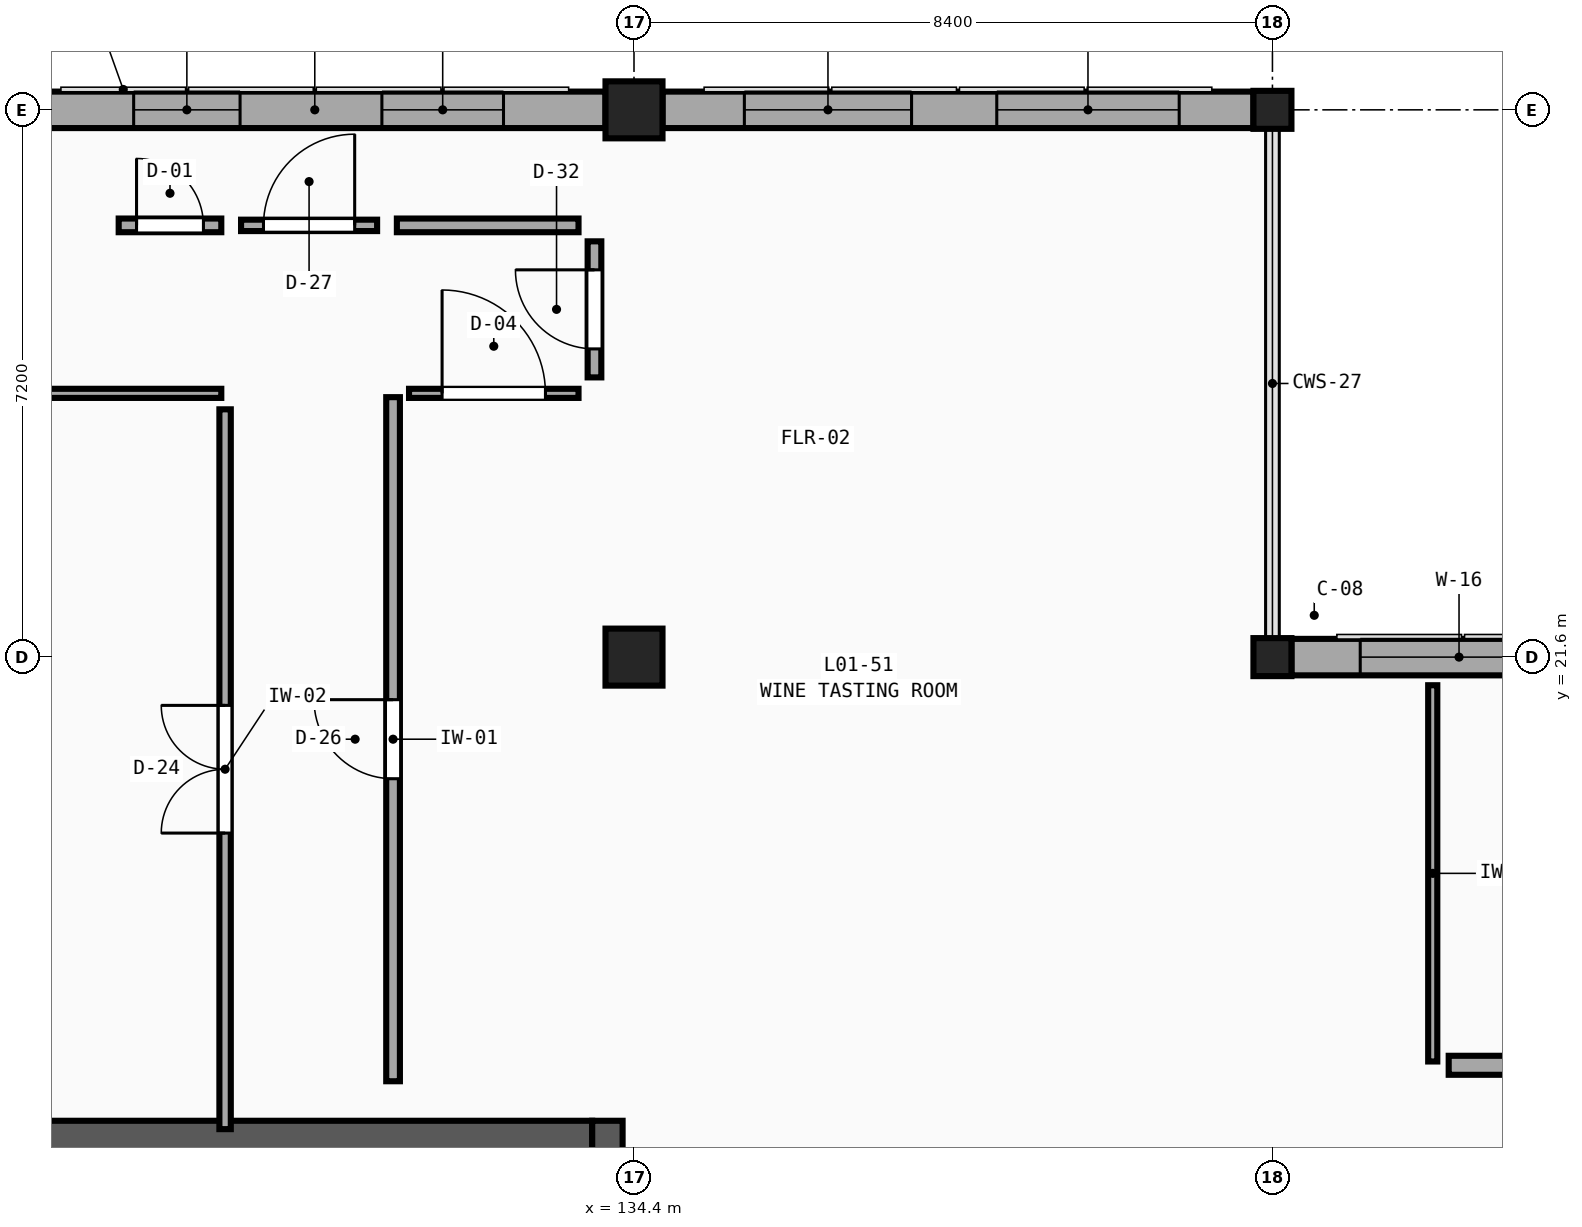
"""IFC4 building model, lengths in metres.
Left out: names, types, materials, properties, quantities, classifications, styles, units other than length and angle.
Written with IfcOpenShell. Run it as: python <this file> out.ifc"""

import sys

from ifc_helpers import new_model, si_unit, direction, frame, frame_2d, origin, origin_2d, place, context, subcontext, project, spatial, rectangle, extrude, element, fill, save


model = new_model("IFC4")
c1 = context("Model", 3, precision=1e-05, world=origin(), true_north=direction((0.0, 1.0)))
c2 = subcontext(c1, "Body", "Model", "MODEL_VIEW")
j1 = project(units=[si_unit("LENGTHUNIT", "METRE"), si_unit("PLANEANGLEUNIT", "RADIAN")], contexts=[c1])
p1 = place(None, origin())
s1 = spatial("IfcSite", under=j1, at=p1, CompositionType="ELEMENT")
p2 = place(p1, origin())
s2 = spatial("IfcBuilding", under=s1, at=p2, CompositionType="ELEMENT")
p3 = place(p2, frame((0.0, 0.0, 5.4)))
s3 = spatial("IfcBuildingStorey", under=s2, at=p3, CompositionType="ELEMENT", Elevation=5.4)
for number, where, z_axis, x_axis in (
    (1, (134.4, 21.6, 0.0), (0.0, 0.0, 1.0), (1.0, 0.0, 0.0)),
    (2, (134.4, 28.8, 0.0), (0.0, 0.0, 1.0), (1.0, 0.0, 0.0)),
):
    element("IfcColumn", number, at=place(p3, frame(where, z_axis=z_axis, x_axis=x_axis)), inside=s3, PredefinedType="COLUMN", context=c2, shape_type="SweptSolid", body=[
        extrude(rectangle(XDim=0.75, YDim=0.75, at=origin_2d()), origin(), (0.0, 0.0, 1.0), 4.5),
    ])
for number, where, z_axis, x_axis in (
    (3, (142.8, 21.6, 0.0), (0.0, 0.0, 1.0), (1.0, 0.0, 0.0)),
    (4, (142.8, 28.8, 0.0), (0.0, 0.0, 1.0), (1.0, 0.0, 0.0)),
):
    element("IfcColumn", number, at=place(p3, frame(where, z_axis=z_axis, x_axis=x_axis)), inside=s3, PredefinedType="COLUMN", context=c2, shape_type="SweptSolid", body=[
        extrude(rectangle(XDim=0.5, YDim=0.5, at=origin_2d()), origin(), (0.0, 0.0, 1.0), 4.5),
    ])
p4 = place(p3, frame((126.375, 28.8, 0.0), z_axis=(0.0, 0.0, 1.0), x_axis=(1.0, 0.0, 0.0)))
e5 = element("IfcWall", 5, at=p4, inside=s3, PredefinedType="SOLIDWALL", context=c2, shape_type="SweptSolid", body=[
    extrude(rectangle(XDim=7.65, YDim=0.48, at=frame_2d((3.825, 0.0))), origin(), (0.0, 0.0, 1.0), 3.63),
])
p5 = place(p4, frame((1.442, 0.0, 0.75)))
e6 = element("IfcOpeningElement", 6, at=p5, cuts=e5, PredefinedType="OPENING", context=c2, shape_type="SweptSolid", body=[
    extrude(rectangle(XDim=1.4, YDim=2.08, at=frame_2d((0.7, 1.04))), frame((0.0, 0.26, 0.0), z_axis=(0.0, -1.0, 0.0), x_axis=(1.0, 0.0, 0.0)), (0.0, 0.0, 1.0), 0.52),
])
p6 = place(p4, frame((4.708, 0.0, 0.75)))
e7 = element("IfcOpeningElement", 7, at=p6, cuts=e5, PredefinedType="OPENING", context=c2, shape_type="SweptSolid", body=[
    extrude(rectangle(XDim=1.6, YDim=2.08, at=frame_2d((0.8, 1.04))), frame((0.0, 0.26, 0.0), z_axis=(0.0, -1.0, 0.0), x_axis=(1.0, 0.0, 0.0)), (0.0, 0.0, 1.0), 0.52),
])
p7 = place(p3, frame((134.775, 28.8, 0.0), z_axis=(0.0, 0.0, 1.0), x_axis=(1.0, 0.0, 0.0)))
e8 = element("IfcWall", 8, at=p7, inside=s3, PredefinedType="SOLIDWALL", context=c2, shape_type="SweptSolid", body=[
    extrude(rectangle(XDim=7.775, YDim=0.48, at=frame_2d((3.888, 0.0))), origin(), (0.0, 0.0, 1.0), 3.63),
])
p8 = place(p7, frame((1.077, 0.0, 0.75)))
e9 = element("IfcOpeningElement", 9, at=p8, cuts=e8, PredefinedType="OPENING", context=c2, shape_type="SweptSolid", body=[
    extrude(rectangle(XDim=2.2, YDim=2.08, at=frame_2d((1.1, 1.04))), frame((0.0, 0.26, 0.0), z_axis=(0.0, -1.0, 0.0), x_axis=(1.0, 0.0, 0.0)), (0.0, 0.0, 1.0), 0.52),
])
p9 = place(p7, frame((4.398, 0.0, 0.75)))
e10 = element("IfcOpeningElement", 10, at=p9, cuts=e8, PredefinedType="OPENING", context=c2, shape_type="SweptSolid", body=[
    extrude(rectangle(XDim=2.4, YDim=2.08, at=frame_2d((1.2, 1.04))), frame((0.0, 0.26, 0.0), z_axis=(0.0, -1.0, 0.0), x_axis=(1.0, 0.0, 0.0)), (0.0, 0.0, 1.0), 0.52),
])
p10 = place(p3, frame((143.05, 21.6, 0.0), z_axis=(0.0, 0.0, 1.0), x_axis=(1.0, 0.0, 0.0)))
e11 = element("IfcWall", 11, at=p10, inside=s3, PredefinedType="SOLIDWALL", context=c2, shape_type="SweptSolid", body=[
    extrude(rectangle(XDim=7.875, YDim=0.48, at=frame_2d((3.938, 0.0))), origin(), (0.0, 0.0, 1.0), 3.63),
])
p11 = place(p10, frame((0.905, 0.0, 0.75)))
e12 = element("IfcOpeningElement", 12, at=p11, cuts=e11, PredefinedType="OPENING", context=c2, shape_type="SweptSolid", body=[
    extrude(rectangle(XDim=2.6, YDim=2.08, at=frame_2d((1.3, 1.04))), frame((0.0, 0.26, 0.0), z_axis=(0.0, -1.0, 0.0), x_axis=(1.0, 0.0, 0.0)), (0.0, 0.0, 1.0), 0.52),
])
p12 = place(p10, frame((5.07, 0.0, 0.75)))
e13 = element("IfcOpeningElement", 13, at=p12, cuts=e11, PredefinedType="OPENING", context=c2, shape_type="SweptSolid", body=[
    extrude(rectangle(XDim=1.2, YDim=2.26, at=frame_2d((0.6, 1.13))), frame((0.0, 0.26, 0.0), z_axis=(0.0, -1.0, 0.0), x_axis=(1.0, 0.0, 0.0)), (0.0, 0.0, 1.0), 0.52),
])
p13 = place(p3, frame((126.55, 15.3, 0.0), z_axis=(0.0, 0.0, 1.0), x_axis=(1.0, 0.0, 0.0)))
e14 = element("IfcWall", 14, at=p13, inside=s3, PredefinedType="SHEAR", context=c2, shape_type="SweptSolid", body=[
    extrude(rectangle(XDim=7.3, YDim=0.4, at=frame_2d((3.65, 0.0))), origin(), (0.0, 0.0, 1.0), 4.5),
])
p14 = place(p3, frame((134.05, 7.25, 0.0), z_axis=(0.0, 0.0, 1.0), x_axis=(0.0, 1.0, 0.0)))
e15 = element("IfcWall", 15, at=p14, inside=s3, PredefinedType="SHEAR", context=c2, shape_type="SweptSolid", body=[
    extrude(rectangle(XDim=8.25, YDim=0.4, at=frame_2d((4.125, 0.0))), origin(), (0.0, 0.0, 1.0), 4.5),
])
p15 = place(p3, frame((114.48, 25.07, 0.0), z_axis=(0.0, 0.0, 1.0), x_axis=(1.0, 0.0, 0.0)))
e16 = element("IfcWall", 16, at=p15, inside=s3, PredefinedType="PARTITIONING", context=c2, shape_type="SweptSolid", body=[
    extrude(rectangle(XDim=14.49, YDim=0.12, at=frame_2d((7.245, 0.0))), origin(), (0.0, 0.0, 1.0), 4.18),
])
p16 = place(p15, frame((6.565, 0.0, 0.0)))
e17 = element("IfcOpeningElement", 17, at=p16, cuts=e16, PredefinedType="OPENING", context=c2, shape_type="SweptSolid", body=[
    extrude(rectangle(XDim=1.36, YDim=2.13, at=frame_2d((0.68, 1.065))), frame((0.0, 0.08, 0.0), z_axis=(0.0, -1.0, 0.0), x_axis=(1.0, 0.0, 0.0)), (0.0, 0.0, 1.0), 0.16),
])
p17 = place(p3, frame((129.02, 15.39, 0.0), z_axis=(0.0, 0.0, 1.0), x_axis=(0.0, 1.0, 0.0)))
e18 = element("IfcWall", 18, at=p17, inside=s3, PredefinedType="PARTITIONING", context=c2, shape_type="SweptSolid", body=[
    extrude(rectangle(XDim=9.47, YDim=0.15, at=frame_2d((4.735, 0.0))), origin(), (0.0, 0.0, 1.0), 4.18),
])
p18 = place(p17, frame((3.895, 0.0, 0.0)))
e19 = element("IfcOpeningElement", 19, at=p18, cuts=e18, PredefinedType="OPENING", context=c2, shape_type="SweptSolid", body=[
    extrude(rectangle(XDim=1.68, YDim=2.29, at=frame_2d((0.84, 1.145))), frame((0.0, 0.095, 0.0), z_axis=(0.0, -1.0, 0.0), x_axis=(1.0, 0.0, 0.0)), (0.0, 0.0, 1.0), 0.19),
])
p19 = place(p3, frame((131.23, 16.02, 0.0), z_axis=(0.0, 0.0, 1.0), x_axis=(0.0, 1.0, 0.0)))
e20 = element("IfcWall", 20, at=p19, inside=s3, PredefinedType="PARTITIONING", context=c2, shape_type="SweptSolid", body=[
    extrude(rectangle(XDim=9.0, YDim=0.18, at=frame_2d((4.5, 0.0))), origin(), (0.0, 0.0, 1.0), 4.18),
])
p20 = place(p19, frame((3.98, 0.0, 0.0)))
e21 = element("IfcOpeningElement", 21, at=p20, cuts=e20, PredefinedType="OPENING", context=c2, shape_type="SweptSolid", body=[
    extrude(rectangle(XDim=1.04, YDim=2.37, at=frame_2d((0.52, 1.185))), frame((0.0, 0.11, 0.0), z_axis=(0.0, -1.0, 0.0), x_axis=(1.0, 0.0, 0.0)), (0.0, 0.0, 1.0), 0.22),
])
p21 = place(p3, frame((131.28, 27.28, 0.0), z_axis=(0.0, 0.0, 1.0), x_axis=(1.0, 0.0, 0.0)))
e22 = element("IfcWall", 22, at=p21, inside=s3, PredefinedType="PARTITIONING", context=c2, shape_type="SweptSolid", body=[
    extrude(rectangle(XDim=2.39, YDim=0.18, at=frame_2d((1.195, 0.0))), origin(), (0.0, 0.0, 1.0), 4.18),
])
p22 = place(p3, frame((131.44, 25.07, 0.0), z_axis=(0.0, 0.0, 1.0), x_axis=(1.0, 0.0, 0.0)))
e23 = element("IfcWall", 23, at=p22, inside=s3, PredefinedType="PARTITIONING", context=c2, shape_type="SweptSolid", body=[
    extrude(rectangle(XDim=2.23, YDim=0.12, at=frame_2d((1.115, 0.0))), origin(), (0.0, 0.0, 1.0), 4.18),
])
p23 = place(p22, frame((0.435, 0.0, 0.0)))
e24 = element("IfcOpeningElement", 24, at=p23, cuts=e23, PredefinedType="OPENING", context=c2, shape_type="SweptSolid", body=[
    extrude(rectangle(XDim=1.36, YDim=2.05, at=frame_2d((0.68, 1.025))), frame((0.0, 0.08, 0.0), z_axis=(0.0, -1.0, 0.0), x_axis=(1.0, 0.0, 0.0)), (0.0, 0.0, 1.0), 0.16),
])
p24 = place(p3, frame((129.23, 27.28, 0.0), z_axis=(0.0, 0.0, 1.0), x_axis=(1.0, 0.0, 0.0)))
e25 = element("IfcWall", 25, at=p24, inside=s3, PredefinedType="PARTITIONING", context=c2, shape_type="SweptSolid", body=[
    extrude(rectangle(XDim=1.79, YDim=0.15, at=frame_2d((0.895, 0.0))), origin(), (0.0, 0.0, 1.0), 4.18),
])
p25 = place(p24, frame((0.295, 0.0, 0.0)))
e26 = element("IfcOpeningElement", 26, at=p25, cuts=e25, PredefinedType="OPENING", context=c2, shape_type="SweptSolid", body=[
    extrude(rectangle(XDim=1.2, YDim=2.37, at=frame_2d((0.6, 1.185))), frame((0.0, 0.095, 0.0), z_axis=(0.0, -1.0, 0.0), x_axis=(1.0, 0.0, 0.0)), (0.0, 0.0, 1.0), 0.19),
])
p26 = place(p3, frame((133.88, 25.28, 0.0), z_axis=(0.0, 0.0, 1.0), x_axis=(0.0, 1.0, 0.0)))
e27 = element("IfcWall", 27, at=p26, inside=s3, PredefinedType="PARTITIONING", context=c2, shape_type="SweptSolid", body=[
    extrude(rectangle(XDim=1.79, YDim=0.18, at=frame_2d((0.895, 0.0))), origin(), (0.0, 0.0, 1.0), 3.73),
])
p27 = place(p26, frame((0.375, 0.0, 0.0)))
e28 = element("IfcOpeningElement", 28, at=p27, cuts=e27, PredefinedType="OPENING", context=c2, shape_type="SweptSolid", body=[
    extrude(rectangle(XDim=1.04, YDim=2.45, at=frame_2d((0.52, 1.225))), frame((0.0, 0.11, 0.0), z_axis=(0.0, -1.0, 0.0), x_axis=(1.0, 0.0, 0.0)), (0.0, 0.0, 1.0), 0.22),
])
p28 = place(p3, frame((127.62, 27.28, 0.0), z_axis=(0.0, 0.0, 1.0), x_axis=(1.0, 0.0, 0.0)))
e29 = element("IfcWall", 29, at=p28, inside=s3, PredefinedType="PARTITIONING", context=c2, shape_type="SweptSolid", body=[
    extrude(rectangle(XDim=1.35, YDim=0.18, at=frame_2d((0.675, 0.0))), origin(), (0.0, 0.0, 1.0), 4.18),
])
p29 = place(p28, frame((0.235, 0.0, 0.0)))
e30 = element("IfcOpeningElement", 30, at=p29, cuts=e29, PredefinedType="OPENING", context=c2, shape_type="SweptSolid", body=[
    extrude(rectangle(XDim=0.88, YDim=2.05, at=frame_2d((0.44, 1.025))), frame((0.0, 0.11, 0.0), z_axis=(0.0, -1.0, 0.0), x_axis=(1.0, 0.0, 0.0)), (0.0, 0.0, 1.0), 0.22),
])
p30 = place(p3, frame((145.119, 16.23, 0.0), z_axis=(0.0, 0.0, 1.0), x_axis=(1.0, 0.0, 0.0)))
e31 = element("IfcWall", 31, at=p30, inside=s3, PredefinedType="SOLIDWALL", context=c2, shape_type="SweptSolid", body=[
    extrude(rectangle(XDim=22.511, YDim=0.25, at=frame_2d((11.255, 0.0))), origin(), (0.0, 0.0, 1.0), 4.18),
])
p31 = place(p30, frame((10.355, 0.0, 0.0)))
e32 = element("IfcOpeningElement", 32, at=p31, cuts=e31, PredefinedType="OPENING", context=c2, shape_type="SweptSolid", body=[
    extrude(rectangle(XDim=1.8, YDim=2.3, at=frame_2d((0.9, 1.15))), frame((0.0, 0.145, 0.0), z_axis=(0.0, -1.0, 0.0), x_axis=(1.0, 0.0, 0.0)), (0.0, 0.0, 1.0), 0.29),
])
p32 = place(p3, frame((144.909, 16.28, 0.0), z_axis=(0.0, 0.0, 1.0), x_axis=(0.0, 1.0, 0.0)))
e33 = element("IfcWall", 33, at=p32, inside=s3, PredefinedType="PARTITIONING", context=c2, shape_type="SweptSolid", body=[
    extrude(rectangle(XDim=4.95, YDim=0.12, at=frame_2d((2.475, 0.0))), origin(), (0.0, 0.0, 1.0), 4.18),
])
p33 = place(p5, origin())
e34 = element("IfcWindow", 34, at=p33, inside=s3, PartitioningType="DOUBLE_PANEL_VERTICAL", PredefinedType="WINDOW", context=c2, shape_type="SweptSolid", body=[
    extrude(rectangle(XDim=1.4, YDim=2.08, at=frame_2d((0.7, 1.04))), frame((0.0, 0.03, 0.0), z_axis=(0.0, -1.0, 0.0), x_axis=(1.0, 0.0, 0.0)), (0.0, 0.0, 1.0), 0.06),
])
fill(e6, e34)
p34 = place(p6, origin())
e35 = element("IfcWindow", 35, at=p34, inside=s3, PartitioningType="DOUBLE_PANEL_VERTICAL", PredefinedType="WINDOW", context=c2, shape_type="SweptSolid", body=[
    extrude(rectangle(XDim=1.6, YDim=2.08, at=frame_2d((0.8, 1.04))), frame((0.0, 0.03, 0.0), z_axis=(0.0, -1.0, 0.0), x_axis=(1.0, 0.0, 0.0)), (0.0, 0.0, 1.0), 0.06),
])
fill(e7, e35)
p35 = place(p8, origin())
e36 = element("IfcWindow", 36, at=p35, inside=s3, PartitioningType="TRIPLE_PANEL_VERTICAL", PredefinedType="WINDOW", context=c2, shape_type="SweptSolid", body=[
    extrude(rectangle(XDim=2.2, YDim=2.08, at=frame_2d((1.1, 1.04))), frame((0.0, 0.03, 0.0), z_axis=(0.0, -1.0, 0.0), x_axis=(1.0, 0.0, 0.0)), (0.0, 0.0, 1.0), 0.06),
])
fill(e9, e36)
p36 = place(p9, origin())
e37 = element("IfcWindow", 37, at=p36, inside=s3, PartitioningType="TRIPLE_PANEL_VERTICAL", PredefinedType="WINDOW", context=c2, shape_type="SweptSolid", body=[
    extrude(rectangle(XDim=2.4, YDim=2.08, at=frame_2d((1.2, 1.04))), frame((0.0, 0.03, 0.0), z_axis=(0.0, -1.0, 0.0), x_axis=(1.0, 0.0, 0.0)), (0.0, 0.0, 1.0), 0.06),
])
fill(e10, e37)
p37 = place(p11, origin())
e38 = element("IfcWindow", 38, at=p37, inside=s3, PartitioningType="TRIPLE_PANEL_VERTICAL", PredefinedType="WINDOW", context=c2, shape_type="SweptSolid", body=[
    extrude(rectangle(XDim=2.6, YDim=2.08, at=frame_2d((1.3, 1.04))), frame((0.0, 0.03, 0.0), z_axis=(0.0, -1.0, 0.0), x_axis=(1.0, 0.0, 0.0)), (0.0, 0.0, 1.0), 0.06),
])
fill(e12, e38)
p38 = place(p18, origin())
e39 = element("IfcDoor", 39, at=p38, inside=s3, OperationType="DOUBLE_DOOR_SINGLE_SWING", PredefinedType="DOOR", context=c2, shape_type="SweptSolid", body=[
    extrude(rectangle(XDim=1.68, YDim=2.29, at=frame_2d((0.84, 1.145))), frame((0.0, 0.025, 0.0), z_axis=(0.0, -1.0, 0.0), x_axis=(1.0, 0.0, 0.0)), (0.0, 0.0, 1.0), 0.05),
])
fill(e19, e39)
p39 = place(p20, origin())
e40 = element("IfcDoor", 40, at=p39, inside=s3, OperationType="SINGLE_SWING_RIGHT", PredefinedType="DOOR", context=c2, shape_type="SweptSolid", body=[
    extrude(rectangle(XDim=1.04, YDim=2.37, at=frame_2d((0.52, 1.185))), frame((0.0, 0.025, 0.0), z_axis=(0.0, -1.0, 0.0), x_axis=(1.0, 0.0, 0.0)), (0.0, 0.0, 1.0), 0.05),
])
fill(e21, e40)
p40 = place(p23, origin())
e41 = element("IfcDoor", 41, at=p40, inside=s3, OperationType="SINGLE_SWING_LEFT", PredefinedType="DOOR", context=c2, shape_type="SweptSolid", body=[
    extrude(rectangle(XDim=1.36, YDim=2.05, at=frame_2d((0.68, 1.025))), frame((0.0, 0.025, 0.0), z_axis=(0.0, -1.0, 0.0), x_axis=(1.0, 0.0, 0.0)), (0.0, 0.0, 1.0), 0.05),
])
fill(e24, e41)
p41 = place(p25, origin())
e42 = element("IfcDoor", 42, at=p41, inside=s3, OperationType="SINGLE_SWING_RIGHT", PredefinedType="DOOR", context=c2, shape_type="SweptSolid", body=[
    extrude(rectangle(XDim=1.2, YDim=2.37, at=frame_2d((0.6, 1.185))), frame((0.0, 0.025, 0.0), z_axis=(0.0, -1.0, 0.0), x_axis=(1.0, 0.0, 0.0)), (0.0, 0.0, 1.0), 0.05),
])
fill(e26, e42)
p42 = place(p27, origin())
e43 = element("IfcDoor", 43, at=p42, inside=s3, OperationType="SINGLE_SWING_RIGHT", PredefinedType="DOOR", context=c2, shape_type="SweptSolid", body=[
    extrude(rectangle(XDim=1.04, YDim=2.45, at=frame_2d((0.52, 1.225))), frame((0.0, 0.025, 0.0), z_axis=(0.0, -1.0, 0.0), x_axis=(1.0, 0.0, 0.0)), (0.0, 0.0, 1.0), 0.05),
])
fill(e28, e43)
p43 = place(p29, origin())
e44 = element("IfcDoor", 44, at=p43, inside=s3, OperationType="SINGLE_SWING_LEFT", PredefinedType="DOOR", context=c2, shape_type="SweptSolid", body=[
    extrude(rectangle(XDim=0.88, YDim=2.05, at=frame_2d((0.44, 1.025))), frame((0.0, 0.025, 0.0), z_axis=(0.0, -1.0, 0.0), x_axis=(1.0, 0.0, 0.0)), (0.0, 0.0, 1.0), 0.05),
])
fill(e30, e44)
save(model, sys.argv[1])
